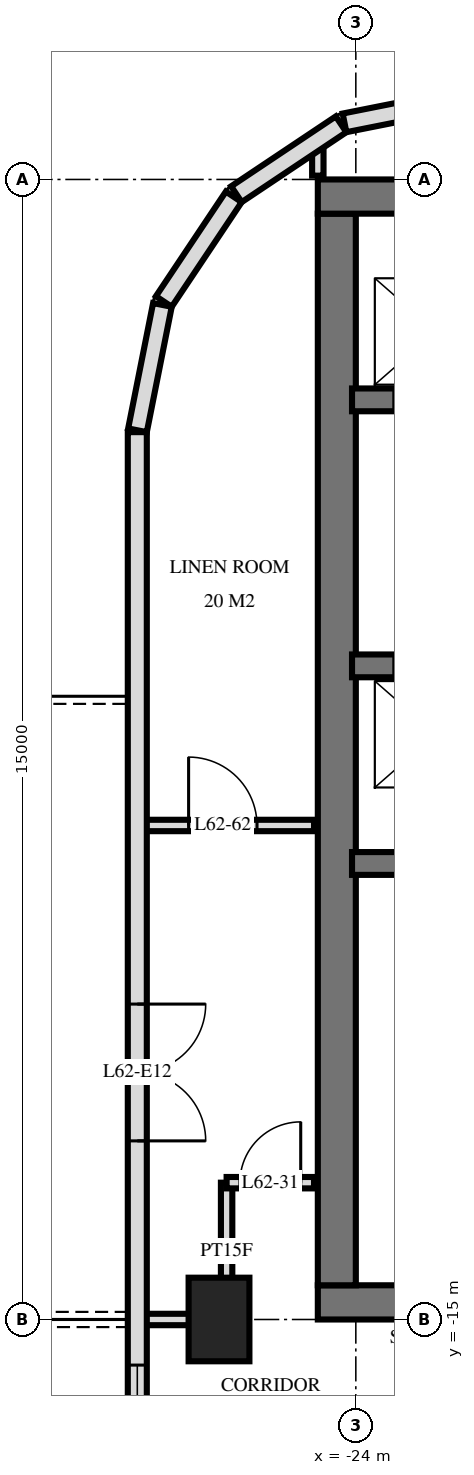
"""IFC4 building model, lengths in metres.
Left out: names, types, materials, properties, quantities, classifications, styles, units other than length and angle.
Written with IfcOpenShell. Run it as: python <this file> out.ifc"""

import sys

from ifc_helpers import new_model, si_unit, direction, frame, frame_2d, origin, origin_2d, place, context, subcontext, project, spatial, rectangle, extrude, element, fill, save


model = new_model("IFC4")
c1 = context("Model", 3, precision=1e-05, world=origin(), true_north=direction((0.0, 1.0)))
c2 = subcontext(c1, "Body", "Model", "MODEL_VIEW")
j1 = project(units=[si_unit("LENGTHUNIT", "METRE"), si_unit("PLANEANGLEUNIT", "RADIAN")], contexts=[c1])
p1 = place(None, origin())
s1 = spatial("IfcSite", under=j1, at=p1, CompositionType="ELEMENT")
p2 = place(p1, origin())
s2 = spatial("IfcBuilding", under=s1, at=p2, CompositionType="ELEMENT")
p3 = place(p2, frame((0.0, 0.0, 236.1)))
s3 = spatial("IfcBuildingStorey", under=s2, at=p3, CompositionType="ELEMENT", Elevation=236.1)
p4 = place(p3, frame((-25.8, -15.0, 0.0), z_axis=(0.0, 0.0, 1.0), x_axis=(0.0, 1.0, 0.0)))
e1 = element("IfcColumn", 1, at=p4, inside=s3, PredefinedType="COLUMN", context=c2, shape_type="SweptSolid", body=[
    extrude(rectangle(XDim=1.1, YDim=0.8, at=origin_2d()), origin(), (0.0, 0.0, 1.0), 3.5),
])
p5 = place(p3, frame((-24.5, -0.225, 0.0), z_axis=(0.0, 0.0, 1.0), x_axis=(1.0, 0.0, 0.0)))
e2 = element("IfcWall", 2, at=p5, inside=s3, PredefinedType="SHEAR", context=c2, shape_type="SweptSolid", body=[
    extrude(rectangle(XDim=14.5, YDim=0.45, at=frame_2d((7.25, 0.0))), origin(), (0.0, 0.0, 1.0), 3.5),
])
p6 = place(p3, frame((-24.5, -14.775, 0.0), z_axis=(0.0, 0.0, 1.0), x_axis=(1.0, 0.0, 0.0)))
e3 = element("IfcWall", 3, at=p6, inside=s3, PredefinedType="SHEAR", context=c2, shape_type="SweptSolid", body=[
    extrude(rectangle(XDim=14.5, YDim=0.45, at=frame_2d((7.25, 0.0))), origin(), (0.0, 0.0, 1.0), 3.5),
])
p7 = place(p6, frame((6.2, 0.0, 0.0)))
e4 = element("IfcOpeningElement", 4, at=p7, cuts=e3, PredefinedType="OPENING", context=c2, shape_type="SweptSolid", body=[
    extrude(rectangle(XDim=1.2, YDim=2.1, at=frame_2d((0.6, 1.05))), frame((0.0, 0.235, 0.0), z_axis=(0.0, -1.0, 0.0), x_axis=(1.0, 0.0, 0.0)), (0.0, 0.0, 1.0), 0.47),
])
p8 = place(p6, frame((9.25, 0.0, 0.0)))
e5 = element("IfcOpeningElement", 5, at=p8, cuts=e3, PredefinedType="OPENING", context=c2, shape_type="SweptSolid", body=[
    extrude(rectangle(XDim=1.1, YDim=2.1, at=frame_2d((0.55, 1.05))), frame((0.0, 0.235, 0.0), z_axis=(0.0, -1.0, 0.0), x_axis=(1.0, 0.0, 0.0)), (0.0, 0.0, 1.0), 0.47),
])
p9 = place(p6, frame((3.5, 0.0, 0.0)))
e6 = element("IfcOpeningElement", 6, at=p9, cuts=e3, PredefinedType="OPENING", context=c2, shape_type="SweptSolid", body=[
    extrude(rectangle(XDim=0.9, YDim=2.1, at=frame_2d((0.45, 1.05))), frame((0.0, 0.235, 0.0), z_axis=(0.0, -1.0, 0.0), x_axis=(1.0, 0.0, 0.0)), (0.0, 0.0, 1.0), 0.47),
])
p10 = place(p6, frame((1.05, 0.0, 0.0)))
e7 = element("IfcOpeningElement", 7, at=p10, cuts=e3, PredefinedType="OPENING", context=c2, shape_type="SweptSolid", body=[
    extrude(rectangle(XDim=1.0, YDim=2.1, at=frame_2d((0.5, 1.05))), frame((0.0, 0.235, 0.0), z_axis=(0.0, -1.0, 0.0), x_axis=(1.0, 0.0, 0.0)), (0.0, 0.0, 1.0), 0.47),
])
p11 = place(p3, frame((-24.25, -14.55, 0.0), z_axis=(0.0, 0.0, 1.0), x_axis=(0.0, 1.0, 0.0)))
e8 = element("IfcWall", 8, at=p11, inside=s3, PredefinedType="SHEAR", context=c2, shape_type="SweptSolid", body=[
    extrude(rectangle(XDim=14.1, YDim=0.5, at=frame_2d((7.05, 0.0))), origin(), (0.0, 0.0, 1.0), 3.5),
])
p12 = place(p3, frame((-24.05, -2.9, 0.0), z_axis=(0.0, 0.0, 1.0), x_axis=(1.0, 0.0, 0.0)))
e9 = element("IfcWall", 9, at=p12, inside=s3, PredefinedType="SHEAR", context=c2, shape_type="SweptSolid", body=[
    extrude(rectangle(XDim=13.7, YDim=0.3, at=frame_2d((6.85, 0.0))), origin(), (0.0, 0.0, 1.0), 3.5),
])
p13 = place(p12, frame((0.55, 0.0, 0.0)))
e10 = element("IfcOpeningElement", 10, at=p13, cuts=e9, PredefinedType="OPENING", context=c2, shape_type="SweptSolid", body=[
    extrude(rectangle(XDim=1.1, YDim=2.1, at=frame_2d((0.55, 1.05))), frame((0.0, 0.16, 0.0), z_axis=(0.0, -1.0, 0.0), x_axis=(1.0, 0.0, 0.0)), (0.0, 0.0, 1.0), 0.32),
])
p14 = place(p12, frame((5.9, 0.0, 0.0)))
e11 = element("IfcOpeningElement", 11, at=p14, cuts=e9, PredefinedType="OPENING", context=c2, shape_type="SweptSolid", body=[
    extrude(rectangle(XDim=0.9, YDim=2.1, at=frame_2d((0.45, 1.05))), frame((0.0, 0.16, 0.0), z_axis=(0.0, -1.0, 0.0), x_axis=(1.0, 0.0, 0.0)), (0.0, 0.0, 1.0), 0.32),
])
p15 = place(p12, frame((11.85, 0.0, 0.0)))
e12 = element("IfcOpeningElement", 12, at=p15, cuts=e9, PredefinedType="OPENING", context=c2, shape_type="SweptSolid", body=[
    extrude(rectangle(XDim=1.0, YDim=2.1, at=frame_2d((0.5, 1.05))), frame((0.0, 0.16, 0.0), z_axis=(0.0, -1.0, 0.0), x_axis=(1.0, 0.0, 0.0)), (0.0, 0.0, 1.0), 0.32),
])
p16 = place(p12, frame((8.85, 0.0, 0.0)))
e13 = element("IfcOpeningElement", 13, at=p16, cuts=e9, PredefinedType="OPENING", context=c2, shape_type="SweptSolid", body=[
    extrude(rectangle(XDim=1.0, YDim=2.1, at=frame_2d((0.5, 1.05))), frame((0.0, 0.16, 0.0), z_axis=(0.0, -1.0, 0.0), x_axis=(1.0, 0.0, 0.0)), (0.0, 0.0, 1.0), 0.32),
])
p17 = place(p12, frame((3.0, 0.0, 0.0)))
e14 = element("IfcOpeningElement", 14, at=p17, cuts=e9, PredefinedType="OPENING", context=c2, shape_type="SweptSolid", body=[
    extrude(rectangle(XDim=1.0, YDim=2.1, at=frame_2d((0.5, 1.05))), frame((0.0, 0.16, 0.0), z_axis=(0.0, -1.0, 0.0), x_axis=(1.0, 0.0, 0.0)), (0.0, 0.0, 1.0), 0.32),
])
p18 = place(p3, frame((-24.05, -6.4, 0.0), z_axis=(0.0, 0.0, 1.0), x_axis=(1.0, 0.0, 0.0)))
e15 = element("IfcWall", 15, at=p18, inside=s3, PredefinedType="SHEAR", context=c2, shape_type="SweptSolid", body=[
    extrude(rectangle(XDim=13.7, YDim=0.3, at=frame_2d((6.85, 0.0))), origin(), (0.0, 0.0, 1.0), 3.5),
])
p19 = place(p18, frame((0.55, 0.0, 0.0)))
e16 = element("IfcOpeningElement", 16, at=p19, cuts=e15, PredefinedType="OPENING", context=c2, shape_type="SweptSolid", body=[
    extrude(rectangle(XDim=1.1, YDim=2.1, at=frame_2d((0.55, 1.05))), frame((0.0, 0.16, 0.0), z_axis=(0.0, -1.0, 0.0), x_axis=(1.0, 0.0, 0.0)), (0.0, 0.0, 1.0), 0.32),
])
p20 = place(p18, frame((5.8, 0.0, 0.0)))
e17 = element("IfcOpeningElement", 17, at=p20, cuts=e15, PredefinedType="OPENING", context=c2, shape_type="SweptSolid", body=[
    extrude(rectangle(XDim=1.1, YDim=2.1, at=frame_2d((0.55, 1.05))), frame((0.0, 0.16, 0.0), z_axis=(0.0, -1.0, 0.0), x_axis=(1.0, 0.0, 0.0)), (0.0, 0.0, 1.0), 0.32),
])
p21 = place(p3, frame((-24.05, -9.0, 0.0), z_axis=(0.0, 0.0, 1.0), x_axis=(1.0, 0.0, 0.0)))
e18 = element("IfcWall", 18, at=p21, inside=s3, PredefinedType="SHEAR", context=c2, shape_type="SweptSolid", body=[
    extrude(rectangle(XDim=13.7, YDim=0.3, at=frame_2d((6.85, 0.0))), origin(), (0.0, 0.0, 1.0), 3.5),
])
p22 = place(p21, frame((8.8, 0.0, 0.0)))
e19 = element("IfcOpeningElement", 19, at=p22, cuts=e18, PredefinedType="OPENING", context=c2, shape_type="SweptSolid", body=[
    extrude(rectangle(XDim=1.1, YDim=2.1, at=frame_2d((0.55, 1.05))), frame((0.0, 0.16, 0.0), z_axis=(0.0, -1.0, 0.0), x_axis=(1.0, 0.0, 0.0)), (0.0, 0.0, 1.0), 0.32),
])
p23 = place(p3, frame((-22.5, 1.073, 0.0), z_axis=(0.0, 0.0, 1.0), x_axis=(-0.980803419081, -0.194999110559, 0.0)))
e20 = element("IfcWall", 20, at=p23, inside=s3, PredefinedType="SOLIDWALL", context=c2, shape_type="SweptSolid", body=[
    extrude(rectangle(XDim=1.681, YDim=0.25, at=frame_2d((0.841, 0.0))), origin(), (0.0, 0.0, 1.0), 3.22),
])
for number, where, z_axis, x_axis in (
    (21, (-24.194, 0.726, 0.0), (0.0, 0.0, 1.0), (-0.831, -0.556, 0.0)),
    (22, (-25.606, -0.229, 0.0), (0.0, 0.0, 1.0), (-0.556, -0.831, 0.0)),
):
    element("IfcWall", number, at=place(p3, frame(where, z_axis=z_axis, x_axis=x_axis)), inside=s3, PredefinedType="SOLIDWALL", context=c2, shape_type="SweptSolid", body=[
        extrude(rectangle(XDim=1.656, YDim=0.25, at=frame_2d((0.828, 0.0))), origin(), (0.0, 0.0, 1.0), 3.22),
    ])
p24 = place(p3, frame((-26.545, -1.651, 0.0), z_axis=(0.0, 0.0, 1.0), x_axis=(-0.194999110559, -0.980803419081, 0.0)))
e23 = element("IfcWall", 23, at=p24, inside=s3, PredefinedType="SOLIDWALL", context=c2, shape_type="SweptSolid", body=[
    extrude(rectangle(XDim=1.681, YDim=0.25, at=frame_2d((0.841, 0.0))), origin(), (0.0, 0.0, 1.0), 3.22),
])
p25 = place(p3, frame((-26.875, -3.325, 0.0), z_axis=(0.0, 0.0, 1.0), x_axis=(0.0, -1.0, 0.0)))
e24 = element("IfcWall", 24, at=p25, inside=s3, PredefinedType="SOLIDWALL", context=c2, shape_type="SweptSolid", body=[
    extrude(rectangle(XDim=21.551, YDim=0.25, at=frame_2d((10.775, 0.0))), origin(), (0.0, 0.0, 1.0), 3.22),
])
p26 = place(p25, frame((7.525, 0.0, 0.0)))
e25 = element("IfcOpeningElement", 25, at=p26, cuts=e24, PredefinedType="OPENING", context=c2, shape_type="SweptSolid", body=[
    extrude(rectangle(XDim=1.8, YDim=2.4, at=frame_2d((0.9, 1.2))), frame((0.0, 0.135, 0.0), z_axis=(0.0, -1.0, 0.0), x_axis=(1.0, 0.0, 0.0)), (0.0, 0.0, 1.0), 0.27),
])
p27 = place(p25, frame((12.275, 0.0, 0.9)))
e26 = element("IfcOpeningElement", 26, at=p27, cuts=e24, PredefinedType="OPENING", context=c2, shape_type="SweptSolid", body=[
    extrude(rectangle(XDim=1.2, YDim=1.5, at=frame_2d((0.6, 0.75))), frame((0.0, 0.135, 0.0), z_axis=(0.0, -1.0, 0.0), x_axis=(1.0, 0.0, 0.0)), (0.0, 0.0, 1.0), 0.27),
])
p28 = place(p25, frame((15.275, 0.0, 0.0)))
e27 = element("IfcOpeningElement", 27, at=p28, cuts=e24, PredefinedType="OPENING", context=c2, shape_type="SweptSolid", body=[
    extrude(rectangle(XDim=1.8, YDim=2.4, at=frame_2d((0.9, 1.2))), frame((0.0, 0.135, 0.0), z_axis=(0.0, -1.0, 0.0), x_axis=(1.0, 0.0, 0.0)), (0.0, 0.0, 1.0), 0.27),
])
p29 = place(p25, frame((18.875, 0.0, 0.0)))
e28 = element("IfcOpeningElement", 28, at=p29, cuts=e24, PredefinedType="OPENING", context=c2, shape_type="SweptSolid", body=[
    extrude(rectangle(XDim=1.8, YDim=2.4, at=frame_2d((0.9, 1.2))), frame((0.0, 0.135, 0.0), z_axis=(0.0, -1.0, 0.0), x_axis=(1.0, 0.0, 0.0)), (0.0, 0.0, 1.0), 0.27),
])
p30 = place(p3, frame((-24.5, 0.05, 0.0), z_axis=(0.0, 0.0, 1.0), x_axis=(0.0, 1.0, 0.0)))
e29 = element("IfcWall", 29, at=p30, inside=s3, PredefinedType="PARTITIONING", context=c2, shape_type="SweptSolid", body=[
    extrude(rectangle(XDim=0.405, YDim=0.15, at=frame_2d((0.203, 0.0))), origin(), (0.0, 0.0, 1.0), 3.22),
])
p31 = place(p3, frame((-25.7, -15.0, 0.0), z_axis=(0.0, 0.0, 1.0), x_axis=(0.0, 1.0, 0.0)))
e30 = element("IfcWall", 30, at=p31, inside=s3, PredefinedType="PARTITIONING", context=c2, shape_type="SweptSolid", body=[
    extrude(rectangle(XDim=1.8, YDim=0.15, at=frame_2d((0.9, 0.0))), origin(), (0.0, 0.0, 1.0), 3.22),
])
p32 = place(p3, frame((-26.82, -15.0, 0.0), z_axis=(0.0, 0.0, 1.0), x_axis=(1.0, 0.0, 0.0)))
e31 = element("IfcWall", 31, at=p32, inside=s3, PredefinedType="PARTITIONING", context=c2, shape_type="SweptSolid", body=[
    extrude(rectangle(XDim=1.12, YDim=0.15, at=frame_2d((0.56, 0.0))), origin(), (0.0, 0.0, 1.0), 3.22),
])
p33 = place(p3, frame((-25.7, -13.2, 0.0), z_axis=(0.0, 0.0, 1.0), x_axis=(1.0, 0.0, 0.0)))
e32 = element("IfcWall", 32, at=p33, inside=s3, PredefinedType="PARTITIONING", context=c2, shape_type="SweptSolid", body=[
    extrude(rectangle(XDim=1.15, YDim=0.15, at=frame_2d((0.575, 0.0))), origin(), (0.0, 0.0, 1.0), 3.22),
])
p34 = place(p33, frame((0.175, 0.0, 0.0)))
e33 = element("IfcOpeningElement", 33, at=p34, cuts=e32, PredefinedType="OPENING", context=c2, shape_type="SweptSolid", body=[
    extrude(rectangle(XDim=0.8, YDim=2.1, at=frame_2d((0.4, 1.05))), frame((0.0, 0.085, 0.0), z_axis=(0.0, -1.0, 0.0), x_axis=(1.0, 0.0, 0.0)), (0.0, 0.0, 1.0), 0.17),
])
p35 = place(p3, frame((-26.82, -8.5, 0.0), z_axis=(0.0, 0.0, 1.0), x_axis=(1.0, 0.0, 0.0)))
e34 = element("IfcWall", 34, at=p35, inside=s3, PredefinedType="PARTITIONING", context=c2, shape_type="SweptSolid", body=[
    extrude(rectangle(XDim=2.27, YDim=0.15, at=frame_2d((1.135, 0.0))), origin(), (0.0, 0.0, 1.0), 3.22),
])
p36 = place(p35, frame((0.62, 0.0, 0.0)))
e35 = element("IfcOpeningElement", 35, at=p36, cuts=e34, PredefinedType="OPENING", context=c2, shape_type="SweptSolid", body=[
    extrude(rectangle(XDim=0.9, YDim=2.1, at=frame_2d((0.45, 1.05))), frame((0.0, 0.085, 0.0), z_axis=(0.0, -1.0, 0.0), x_axis=(1.0, 0.0, 0.0)), (0.0, 0.0, 1.0), 0.17),
])
p37 = place(p26, origin())
e36 = element("IfcDoor", 36, at=p37, inside=s3, OperationType="DOUBLE_DOOR_SINGLE_SWING", PredefinedType="DOOR", context=c2, shape_type="SweptSolid", body=[
    extrude(rectangle(XDim=1.8, YDim=2.4, at=frame_2d((0.9, 1.2))), frame((0.0, 0.025, 0.0), z_axis=(0.0, -1.0, 0.0), x_axis=(1.0, 0.0, 0.0)), (0.0, 0.0, 1.0), 0.05),
])
fill(e25, e36)
p38 = place(p27, origin())
e37 = element("IfcWindow", 37, at=p38, inside=s3, PartitioningType="SINGLE_PANEL", PredefinedType="WINDOW", context=c2, shape_type="SweptSolid", body=[
    extrude(rectangle(XDim=1.2, YDim=1.5, at=frame_2d((0.6, 0.75))), frame((0.0, 0.03, 0.0), z_axis=(0.0, -1.0, 0.0), x_axis=(1.0, 0.0, 0.0)), (0.0, 0.0, 1.0), 0.06),
])
fill(e26, e37)
p39 = place(p34, origin())
e38 = element("IfcDoor", 38, at=p39, inside=s3, OperationType="SINGLE_SWING_LEFT", PredefinedType="DOOR", context=c2, shape_type="SweptSolid", body=[
    extrude(rectangle(XDim=0.8, YDim=2.1, at=frame_2d((0.4, 1.05))), frame((0.0, 0.025, 0.0), z_axis=(0.0, -1.0, 0.0), x_axis=(1.0, 0.0, 0.0)), (0.0, 0.0, 1.0), 0.05),
])
fill(e33, e38)
p40 = place(p36, origin())
e39 = element("IfcDoor", 39, at=p40, inside=s3, OperationType="SINGLE_SWING_RIGHT", PredefinedType="DOOR", context=c2, shape_type="SweptSolid", body=[
    extrude(rectangle(XDim=0.9, YDim=2.1, at=frame_2d((0.45, 1.05))), frame((0.0, 0.025, 0.0), z_axis=(0.0, -1.0, 0.0), x_axis=(1.0, 0.0, 0.0)), (0.0, 0.0, 1.0), 0.05),
])
fill(e35, e39)
save(model, sys.argv[1])
